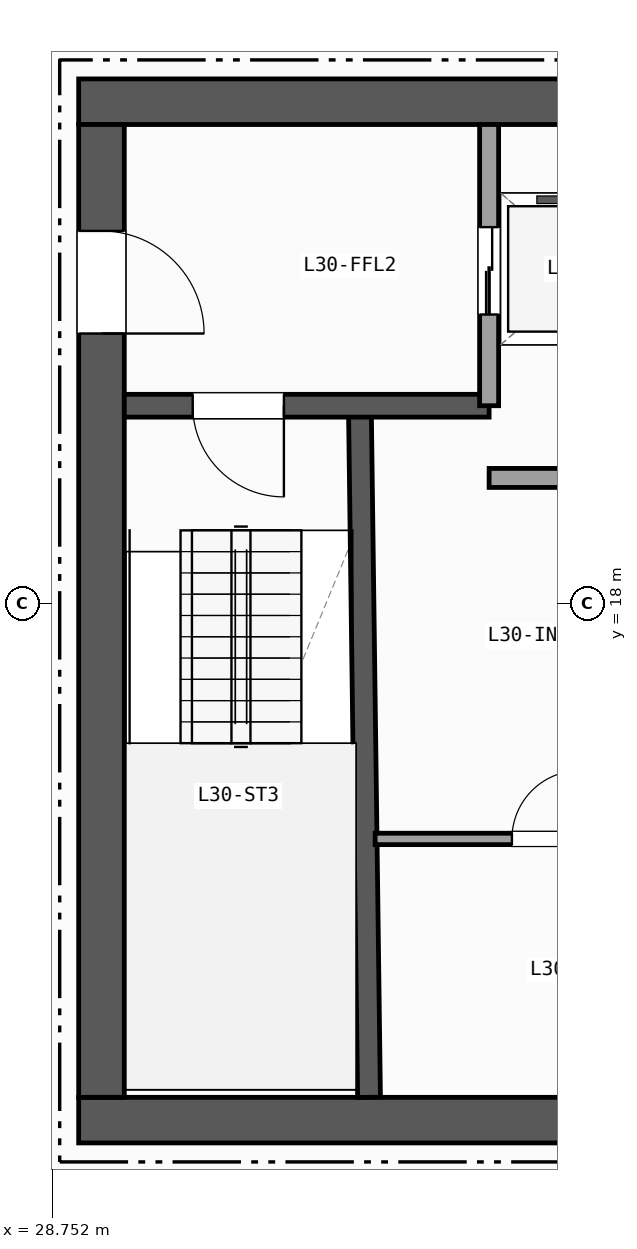
"""IFC4 building model, lengths in metres.
Left out: names, types, materials, properties, quantities, classifications, styles, units other than length and angle.
Written with IfcOpenShell. Run it as: python <this file> out.ifc"""

import sys

from ifc_helpers import new_model, si_unit, direction, frame, frame_2d, origin, place, context, subcontext, project, spatial, rectangle, extrude, element, fill, save


model = new_model("IFC4")
c1 = context("Model", 3, precision=1e-05, world=origin(), true_north=direction((0.0, 1.0)))
c2 = subcontext(c1, "Body", "Model", "MODEL_VIEW")
j1 = project(units=[si_unit("LENGTHUNIT", "METRE"), si_unit("PLANEANGLEUNIT", "RADIAN")], contexts=[c1])
p1 = place(None, origin())
s1 = spatial("IfcSite", under=j1, at=p1, CompositionType="ELEMENT")
p2 = place(p1, origin())
s2 = spatial("IfcBuilding", under=s1, at=p2, CompositionType="ELEMENT")
p3 = place(p2, frame((0.0, 0.0, 124.8)))
s3 = spatial("IfcBuildingStorey", under=s2, at=p3, CompositionType="ELEMENT", Elevation=124.8)
p4 = place(p3, frame((29.1, 11.2, 0.0), z_axis=(0.0, 0.0, 1.0), x_axis=(1.0, 0.0, 0.0)))
e1 = element("IfcWall", 1, at=p4, inside=s3, PredefinedType="SHEAR", context=c2, shape_type="SweptSolid", body=[
    extrude(rectangle(XDim=14.0, YDim=0.6, at=frame_2d((7.0, 0.0))), origin(), (0.0, 0.0, 1.0), 3.42),
])
p5 = place(p3, frame((43.1, 24.6, 0.0), z_axis=(0.0, 0.0, 1.0), x_axis=(-1.0, 0.0, 0.0)))
e2 = element("IfcWall", 2, at=p5, inside=s3, PredefinedType="SHEAR", context=c2, shape_type="SweptSolid", body=[
    extrude(rectangle(XDim=14.0, YDim=0.6, at=frame_2d((7.0, 0.0))), origin(), (0.0, 0.0, 1.0), 3.42),
])
p6 = place(p5, frame((0.8, 0.0, 0.0)))
e3 = element("IfcOpeningElement", 3, at=p6, cuts=e2, PredefinedType="OPENING", context=c2, shape_type="SweptSolid", body=[
    extrude(rectangle(XDim=1.1, YDim=2.15, at=frame_2d((0.55, 1.075))), frame((0.0, 0.31, 0.0), z_axis=(0.0, -1.0, 0.0), x_axis=(1.0, 0.0, 0.0)), (0.0, 0.0, 1.0), 0.62),
])
p7 = place(p5, frame((2.75, 0.0, 0.0)))
e4 = element("IfcOpeningElement", 4, at=p7, cuts=e2, PredefinedType="OPENING", context=c2, shape_type="SweptSolid", body=[
    extrude(rectangle(XDim=0.9, YDim=2.1, at=frame_2d((0.45, 1.05))), frame((0.0, 0.31, 0.0), z_axis=(0.0, -1.0, 0.0), x_axis=(1.0, 0.0, 0.0)), (0.0, 0.0, 1.0), 0.62),
])
p8 = place(p5, frame((4.65, 0.0, 0.0)))
e5 = element("IfcOpeningElement", 5, at=p8, cuts=e2, PredefinedType="OPENING", context=c2, shape_type="SweptSolid", body=[
    extrude(rectangle(XDim=0.9, YDim=2.1, at=frame_2d((0.45, 1.05))), frame((0.0, 0.31, 0.0), z_axis=(0.0, -1.0, 0.0), x_axis=(1.0, 0.0, 0.0)), (0.0, 0.0, 1.0), 0.62),
])
p9 = place(p3, frame((29.4, 24.3, 0.0), z_axis=(0.0, 0.0, 1.0), x_axis=(0.0, -1.0, 0.0)))
e6 = element("IfcWall", 6, at=p9, inside=s3, PredefinedType="SHEAR", context=c2, shape_type="SweptSolid", body=[
    extrude(rectangle(XDim=12.8, YDim=0.6, at=frame_2d((6.4, 0.0))), origin(), (0.0, 0.0, 1.0), 3.42),
])
p10 = place(p9, frame((1.4, 0.0, 0.0)))
e7 = element("IfcOpeningElement", 7, at=p10, cuts=e6, PredefinedType="OPENING", context=c2, shape_type="SweptSolid", body=[
    extrude(rectangle(XDim=1.35, YDim=2.15, at=frame_2d((0.675, 1.075))), frame((0.0, 0.31, 0.0), z_axis=(0.0, -1.0, 0.0), x_axis=(1.0, 0.0, 0.0)), (0.0, 0.0, 1.0), 0.62),
])
p11 = place(p3, frame((32.92, 11.5, 0.0), z_axis=(0.0, 0.0, 1.0), x_axis=(-0.013244407292, 0.999912288991, 0.0)))
e8 = element("IfcWall", 8, at=p11, inside=s3, PredefinedType="SHEAR", context=c2, shape_type="SweptSolid", body=[
    extrude(rectangle(XDim=9.051, YDim=0.3, at=frame_2d((4.525, 0.0))), origin(), (0.0, 0.0, 1.0), 3.42),
])
p12 = place(p3, frame((34.5, 20.6, 0.0), z_axis=(0.0, 0.0, 1.0), x_axis=(-1.0, 0.0, 0.0)))
e9 = element("IfcWall", 9, at=p12, inside=s3, PredefinedType="SHEAR", context=c2, shape_type="SweptSolid", body=[
    extrude(rectangle(XDim=4.8, YDim=0.3, at=frame_2d((2.4, 0.0))), origin(), (0.0, 0.0, 1.0), 3.42),
])
p13 = place(p12, frame((2.7, 0.0, 0.0)))
e10 = element("IfcOpeningElement", 10, at=p13, cuts=e9, PredefinedType="OPENING", context=c2, shape_type="SweptSolid", body=[
    extrude(rectangle(XDim=1.2, YDim=2.15, at=frame_2d((0.6, 1.075))), frame((0.0, 0.16, 0.0), z_axis=(0.0, -1.0, 0.0), x_axis=(1.0, 0.0, 0.0)), (0.0, 0.0, 1.0), 0.32),
])
p14 = place(p3, frame((34.5, 20.6, 0.0), z_axis=(0.0, 0.0, 1.0), x_axis=(0.0, 1.0, 0.0)))
e11 = element("IfcWall", 11, at=p14, inside=s3, PredefinedType="PARTITIONING", context=c2, shape_type="SweptSolid", body=[
    extrude(rectangle(XDim=3.7, YDim=0.25, at=frame_2d((1.85, 0.0))), origin(), (0.0, 0.0, 1.0), 3.42),
])
p15 = place(p14, frame((1.2, 0.0, 0.0)))
e12 = element("IfcOpeningElement", 12, at=p15, cuts=e11, PredefinedType="OPENING", context=c2, shape_type="SweptSolid", body=[
    extrude(rectangle(XDim=1.15, YDim=2.15, at=frame_2d((0.575, 1.075))), frame((0.0, 0.135, 0.0), z_axis=(0.0, -1.0, 0.0), x_axis=(1.0, 0.0, 0.0)), (0.0, 0.0, 1.0), 0.27),
])
p16 = place(p3, frame((34.5, 19.65, 0.0), z_axis=(0.0, 0.0, 1.0), x_axis=(1.0, 0.0, 0.0)))
e13 = element("IfcWall", 13, at=p16, inside=s3, PredefinedType="PARTITIONING", context=c2, shape_type="SweptSolid", body=[
    extrude(rectangle(XDim=6.48, YDim=0.25, at=frame_2d((3.24, 0.0))), origin(), (0.0, 0.0, 1.0), 3.42),
])
p17 = place(p3, frame((33.0, 14.9, 0.0), z_axis=(0.0, 0.0, 1.0), x_axis=(1.0, 0.0, 0.0)))
e14 = element("IfcWall", 14, at=p17, inside=s3, PredefinedType="PARTITIONING", context=c2, shape_type="SweptSolid", body=[
    extrude(rectangle(XDim=5.1, YDim=0.15, at=frame_2d((2.55, 0.0))), origin(), (0.0, 0.0, 1.0), 3.42),
])
p18 = place(p17, frame((1.8, 0.0, 0.0)))
e15 = element("IfcOpeningElement", 15, at=p18, cuts=e14, PredefinedType="OPENING", context=c2, shape_type="SweptSolid", body=[
    extrude(rectangle(XDim=0.9, YDim=2.1, at=frame_2d((0.45, 1.05))), frame((0.0, 0.085, 0.0), z_axis=(0.0, -1.0, 0.0), x_axis=(1.0, 0.0, 0.0)), (0.0, 0.0, 1.0), 0.17),
])
p19 = place(p13, origin())
e16 = element("IfcDoor", 16, at=p19, inside=s3, OperationType="SINGLE_SWING_LEFT", PredefinedType="DOOR", context=c2, shape_type="SweptSolid", body=[
    extrude(rectangle(XDim=1.2, YDim=2.15, at=frame_2d((0.6, 1.075))), frame((0.0, 0.025, 0.0), z_axis=(0.0, -1.0, 0.0), x_axis=(1.0, 0.0, 0.0)), (0.0, 0.0, 1.0), 0.05),
])
fill(e10, e16)
p20 = place(p10, origin())
e17 = element("IfcDoor", 17, at=p20, inside=s3, OperationType="SINGLE_SWING_RIGHT", PredefinedType="DOOR", context=c2, shape_type="SweptSolid", body=[
    extrude(rectangle(XDim=1.35, YDim=2.15, at=frame_2d((0.675, 1.075))), frame((0.0, 0.025, 0.0), z_axis=(0.0, -1.0, 0.0), x_axis=(1.0, 0.0, 0.0)), (0.0, 0.0, 1.0), 0.05),
])
fill(e7, e17)
p21 = place(p15, origin())
e18 = element("IfcDoor", 18, at=p21, inside=s3, OperationType="DOUBLE_DOOR_SLIDING", PredefinedType="DOOR", context=c2, shape_type="SweptSolid", body=[
    extrude(rectangle(XDim=1.15, YDim=2.15, at=frame_2d((0.575, 1.075))), frame((0.0, 0.025, 0.0), z_axis=(0.0, -1.0, 0.0), x_axis=(1.0, 0.0, 0.0)), (0.0, 0.0, 1.0), 0.05),
])
fill(e12, e18)
p22 = place(p18, origin())
e19 = element("IfcDoor", 19, at=p22, inside=s3, OperationType="SINGLE_SWING_RIGHT", PredefinedType="DOOR", context=c2, shape_type="SweptSolid", body=[
    extrude(rectangle(XDim=0.9, YDim=2.1, at=frame_2d((0.45, 1.05))), frame((0.0, 0.025, 0.0), z_axis=(0.0, -1.0, 0.0), x_axis=(1.0, 0.0, 0.0)), (0.0, 0.0, 1.0), 0.05),
])
fill(e15, e19)
save(model, sys.argv[1])
